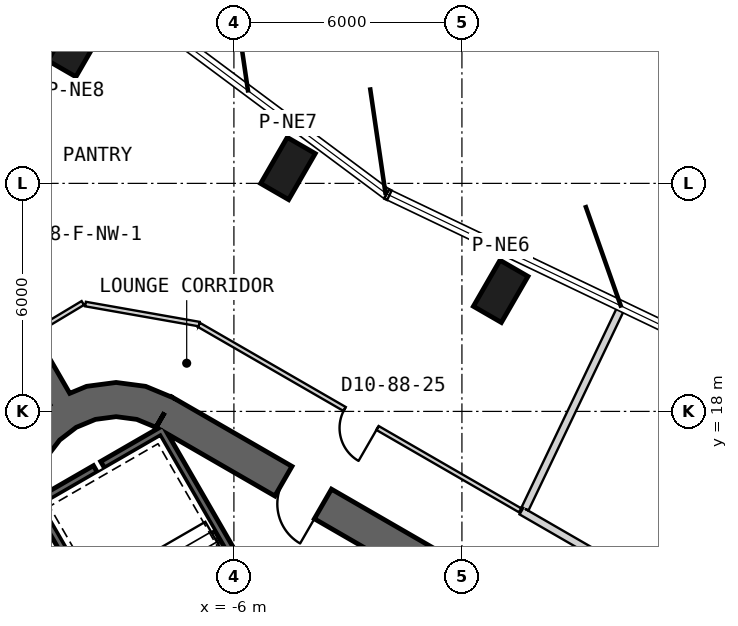
"""IFC4 building model, lengths in metres.
Left out: names, types, materials, properties, quantities, classifications, styles, units other than length and angle.
Written with IfcOpenShell. Run it as: python <this file> out.ifc"""

import sys

from ifc_helpers import new_model, si_unit, direction, frame, frame_2d, origin, origin_2d, place, context, subcontext, project, spatial, polyline, rectangle, outline, extrude, element, fill, save


model = new_model("IFC4")
c1 = context("Model", 3, precision=1e-05, world=origin(), true_north=direction((0.0, 1.0)))
c2 = subcontext(c1, "Body", "Model", "MODEL_VIEW")
j1 = project(units=[si_unit("LENGTHUNIT", "METRE"), si_unit("PLANEANGLEUNIT", "RADIAN")], contexts=[c1])
p1 = place(None, origin())
s1 = spatial("IfcSite", under=j1, at=p1, CompositionType="ELEMENT")
p2 = place(p1, origin())
s2 = spatial("IfcBuilding", under=s1, at=p2, CompositionType="ELEMENT")
p3 = place(p2, frame((0.0, 0.0, 380.6)))
s3 = spatial("IfcBuildingStorey", under=s2, at=p3, CompositionType="ELEMENT", Elevation=380.6)
for number, where, z_axis, x_axis in (
    (1, (1.02, 21.159, 0.0), (0.0, 0.0, 1.0), (0.5, 0.866, 0.0)),
    (2, (-4.578, 24.391, 0.0), (0.0, 0.0, 1.0), (0.5, 0.866, 0.0)),
    (3, (-10.176, 27.623, 0.0), (0.0, 0.0, 1.0), (0.5, 0.866, 0.0)),
):
    element("IfcColumn", number, at=place(p3, frame(where, z_axis=z_axis, x_axis=x_axis)), inside=s3, PredefinedType="COLUMN", context=c2, shape_type="SweptSolid", body=[
        extrude(rectangle(XDim=1.4, YDim=0.85, at=origin_2d()), origin(), (0.0, 0.0, 1.0), 3.9),
    ])
p4 = place(p3, frame((19.475, 2.208, 0.0), z_axis=(0.0, 0.0, 1.0), x_axis=(-0.866028369851, 0.499994862586, 0.0)))
e4 = element("IfcWall", 4, at=p4, inside=s3, PredefinedType="SHEAR", context=c2, shape_type="SweptSolid", body=[
    extrude(rectangle(XDim=31.523, YDim=0.9, at=frame_2d((15.762, 0.0))), origin(), (0.0, 0.0, 1.0), 3.9),
])
p5 = place(p4, frame((7.062, 0.0, 0.0)))
e5 = element("IfcOpeningElement", 5, at=p5, cuts=e4, PredefinedType="OPENING", context=c2, shape_type="SweptSolid", body=[
    extrude(rectangle(XDim=1.2, YDim=2.4, at=frame_2d((0.6, 1.2))), frame((0.0, 0.46, 0.0), z_axis=(0.0, -1.0, 0.0), x_axis=(1.0, 0.0, 0.0)), (0.0, 0.0, 1.0), 0.92),
])
p6 = place(p4, frame((3.612, 0.0, 0.0)))
e6 = element("IfcOpeningElement", 6, at=p6, cuts=e4, PredefinedType="OPENING", context=c2, shape_type="SweptSolid", body=[
    extrude(rectangle(XDim=1.2, YDim=2.4, at=frame_2d((0.6, 1.2))), frame((0.0, 0.46, 0.0), z_axis=(0.0, -1.0, 0.0), x_axis=(1.0, 0.0, 0.0)), (0.0, 0.0, 1.0), 0.92),
])
p7 = place(p4, frame((26.712, 0.0, 0.0)))
e7 = element("IfcOpeningElement", 7, at=p7, cuts=e4, PredefinedType="OPENING", context=c2, shape_type="SweptSolid", body=[
    extrude(rectangle(XDim=1.2, YDim=2.4, at=frame_2d((0.6, 1.2))), frame((0.0, 0.46, 0.0), z_axis=(0.0, -1.0, 0.0), x_axis=(1.0, 0.0, 0.0)), (0.0, 0.0, 1.0), 0.92),
])
p8 = place(p3, origin())
e8 = element("IfcWall", 8, at=p8, inside=s3, PredefinedType="SHEAR", context=c2, shape_type="SweptSolid", body=[
    extrude(outline(polyline([(-7.6, 18.36), (-8.323, 18.659), (-9.1, 18.762), (-9.876, 18.659), (-10.6, 18.36), (-11.221, 17.883), (-11.698, 17.262), (-11.998, 16.538), (-12.1, 15.762), (-11.2, 15.762), (-11.128, 16.305), (-10.919, 16.812), (-10.585, 17.247), (-10.15, 17.58), (-9.644, 17.79), (-9.1, 17.862), (-8.556, 17.79), (-8.05, 17.58), (-7.6, 18.36)])), origin(), (0.0, 0.0, 1.0), 3.9),
])
p9 = place(p3, frame((-10.575, 18.316, 0.0), z_axis=(0.0, 0.0, 1.0), x_axis=(-0.500011655475, 0.866018674388, 0.0)))
e9 = element("IfcWall", 9, at=p9, inside=s3, PredefinedType="SHEAR", context=c2, shape_type="SweptSolid", body=[
    extrude(rectangle(XDim=6.455, YDim=0.6, at=frame_2d((3.228, 0.0))), origin(), (0.0, 0.0, 1.0), 3.9),
])
p10 = place(p9, frame((2.05, 0.0, 0.0)))
e10 = element("IfcOpeningElement", 10, at=p10, cuts=e9, PredefinedType="OPENING", context=c2, shape_type="SweptSolid", body=[
    extrude(rectangle(XDim=1.4, YDim=2.4, at=frame_2d((0.7, 1.2))), frame((0.0, 0.31, 0.0), z_axis=(0.0, -1.0, 0.0), x_axis=(1.0, 0.0, 0.0)), (0.0, 0.0, 1.0), 0.62),
])
p11 = place(p3, frame((-11.245, 15.678, -0.3), z_axis=(0.0, 0.0, 1.0), x_axis=(0.499977274689, -0.866038523851, 0.0)))
e11 = element("IfcWall", 11, at=p11, inside=s3, PredefinedType="SHEAR", context=c2, shape_type="SweptSolid", body=[
    extrude(rectangle(XDim=8.1, YDim=0.2, at=frame_2d((4.05, 0.0))), origin(), (0.0, 0.0, 1.0), 3.9),
])
p12 = place(p3, frame((-7.818, 17.541, -0.3), z_axis=(0.0, 0.0, 1.0), x_axis=(-0.866088799389, -0.499890179513, 0.0)))
e12 = element("IfcWall", 12, at=p12, inside=s3, PredefinedType="SHEAR", context=c2, shape_type="SweptSolid", body=[
    extrude(rectangle(XDim=1.89, YDim=0.2, at=frame_2d((0.945, 0.0))), origin(), (0.0, 0.0, 1.0), 3.9),
])
p13 = place(p3, frame((-9.645, 16.486, -0.3), z_axis=(0.0, 0.0, 1.0), x_axis=(-0.866038843867, -0.499976720371, 0.0)))
e13 = element("IfcWall", 13, at=p13, inside=s3, PredefinedType="SHEAR", context=c2, shape_type="SweptSolid", body=[
    extrude(rectangle(XDim=1.69, YDim=0.2, at=frame_2d((0.845, 0.0))), origin(), (0.0, 0.0, 1.0), 3.9),
])
p14 = place(p3, frame((-7.854, 17.405, -0.3), z_axis=(0.0, 0.0, 1.0), x_axis=(0.499997992926, -0.866026562566, 0.0)))
e14 = element("IfcWall", 14, at=p14, inside=s3, PredefinedType="SHEAR", context=c2, shape_type="SweptSolid", body=[
    extrude(rectangle(XDim=7.9, YDim=0.2, at=frame_2d((3.95, 0.0))), origin(), (0.0, 0.0, 1.0), 3.9),
])
p15 = place(p3, frame((-2.558, 14.409, 0.0), z_axis=(0.0, 0.0, 1.0), x_axis=(-0.508018930956, -0.861345903683, 0.0)))
e15 = element("IfcWall", 15, at=p15, inside=s3, PredefinedType="PARTITIONING", context=c2, shape_type="SweptSolid", body=[
    extrude(rectangle(XDim=3.15, YDim=0.2, at=frame_2d((1.575, 0.0))), origin(), (0.0, 0.0, 1.0), 3.6),
])
p16 = place(p3, frame((21.126, 4.084, 0.0), z_axis=(0.0, 0.0, 1.0), x_axis=(-0.866025296335, 0.500000186108, 0.0)))
e16 = element("IfcWall", 16, at=p16, inside=s3, PredefinedType="PARTITIONING", context=c2, shape_type="SweptSolid", body=[
    extrude(rectangle(XDim=22.523, YDim=0.12, at=frame_2d((11.262, 0.0))), origin(), (0.0, 0.0, 1.0), 2.97),
])
p17 = place(p16, frame((10.86, 0.0, 0.0)))
e17 = element("IfcOpeningElement", 17, at=p17, cuts=e16, PredefinedType="OPENING", context=c2, shape_type="SweptSolid", body=[
    extrude(rectangle(XDim=1.0, YDim=2.1, at=frame_2d((0.5, 1.05))), frame((0.0, 0.07, 0.0), z_axis=(0.0, -1.0, 0.0), x_axis=(1.0, 0.0, 0.0)), (0.0, 0.0, 1.0), 0.14),
])
p18 = place(p3, frame((1.62, 15.346, 0.0), z_axis=(0.0, 0.0, 1.0), x_axis=(-0.866024423855, 0.500001697284, 0.0)))
e18 = element("IfcWall", 18, at=p18, inside=s3, PredefinedType="PARTITIONING", context=c2, shape_type="SweptSolid", body=[
    extrude(rectangle(XDim=9.864, YDim=0.12, at=frame_2d((4.932, 0.0))), origin(), (0.0, 0.0, 1.0), 2.97),
])
p19 = place(p18, frame((4.435, 0.0, 0.0)))
e19 = element("IfcOpeningElement", 19, at=p19, cuts=e18, PredefinedType="OPENING", context=c2, shape_type="SweptSolid", body=[
    extrude(rectangle(XDim=1.0, YDim=2.1, at=frame_2d((0.5, 1.05))), frame((0.0, 0.07, 0.0), z_axis=(0.0, -1.0, 0.0), x_axis=(1.0, 0.0, 0.0)), (0.0, 0.0, 1.0), 0.14),
])
p20 = place(p3, frame((-6.915, 20.297, 0.0), z_axis=(0.0, 0.0, 1.0), x_axis=(-0.984804149706, 0.173668611791, 0.0)))
e20 = element("IfcWall", 20, at=p20, inside=s3, PredefinedType="PARTITIONING", context=c2, shape_type="SweptSolid", body=[
    extrude(rectangle(XDim=2.983, YDim=0.12, at=frame_2d((1.492, 0.0))), origin(), (0.0, 0.0, 1.0), 2.97),
])
p21 = place(p3, frame((4.207, 20.766, 0.0), z_axis=(0.0, 0.0, 1.0), x_axis=(-0.431077681357, -0.902314819027, 0.0)))
e21 = element("IfcWall", 21, at=p21, inside=s3, PredefinedType="PARTITIONING", context=c2, shape_type="SweptSolid", body=[
    extrude(rectangle(XDim=5.946, YDim=0.12, at=frame_2d((2.973, 0.0))), origin(), (0.0, 0.0, 1.0), 3.6),
])
p22 = place(p19, origin())
e22 = element("IfcDoor", 22, at=p22, inside=s3, OperationType="SINGLE_SWING_LEFT", PredefinedType="NOTDEFINED", context=c2, shape_type="SweptSolid", body=[
    extrude(rectangle(XDim=1.0, YDim=2.1, at=frame_2d((0.5, 1.05))), frame((0.0, 0.025, 0.0), z_axis=(0.0, -1.0, 0.0), x_axis=(1.0, 0.0, 0.0)), (0.0, 0.0, 1.0), 0.05),
])
fill(e19, e22)
p23 = place(p7, origin())
e23 = element("IfcDoor", 23, at=p23, inside=s3, OperationType="SINGLE_SWING_LEFT", PredefinedType="USERDEFINED", context=c2, shape_type="SweptSolid", body=[
    extrude(rectangle(XDim=1.2, YDim=2.4, at=frame_2d((0.6, 1.2))), frame((0.0, 0.025, 0.0), z_axis=(0.0, -1.0, 0.0), x_axis=(1.0, 0.0, 0.0)), (0.0, 0.0, 1.0), 0.05),
])
fill(e7, e23)
save(model, sys.argv[1])
